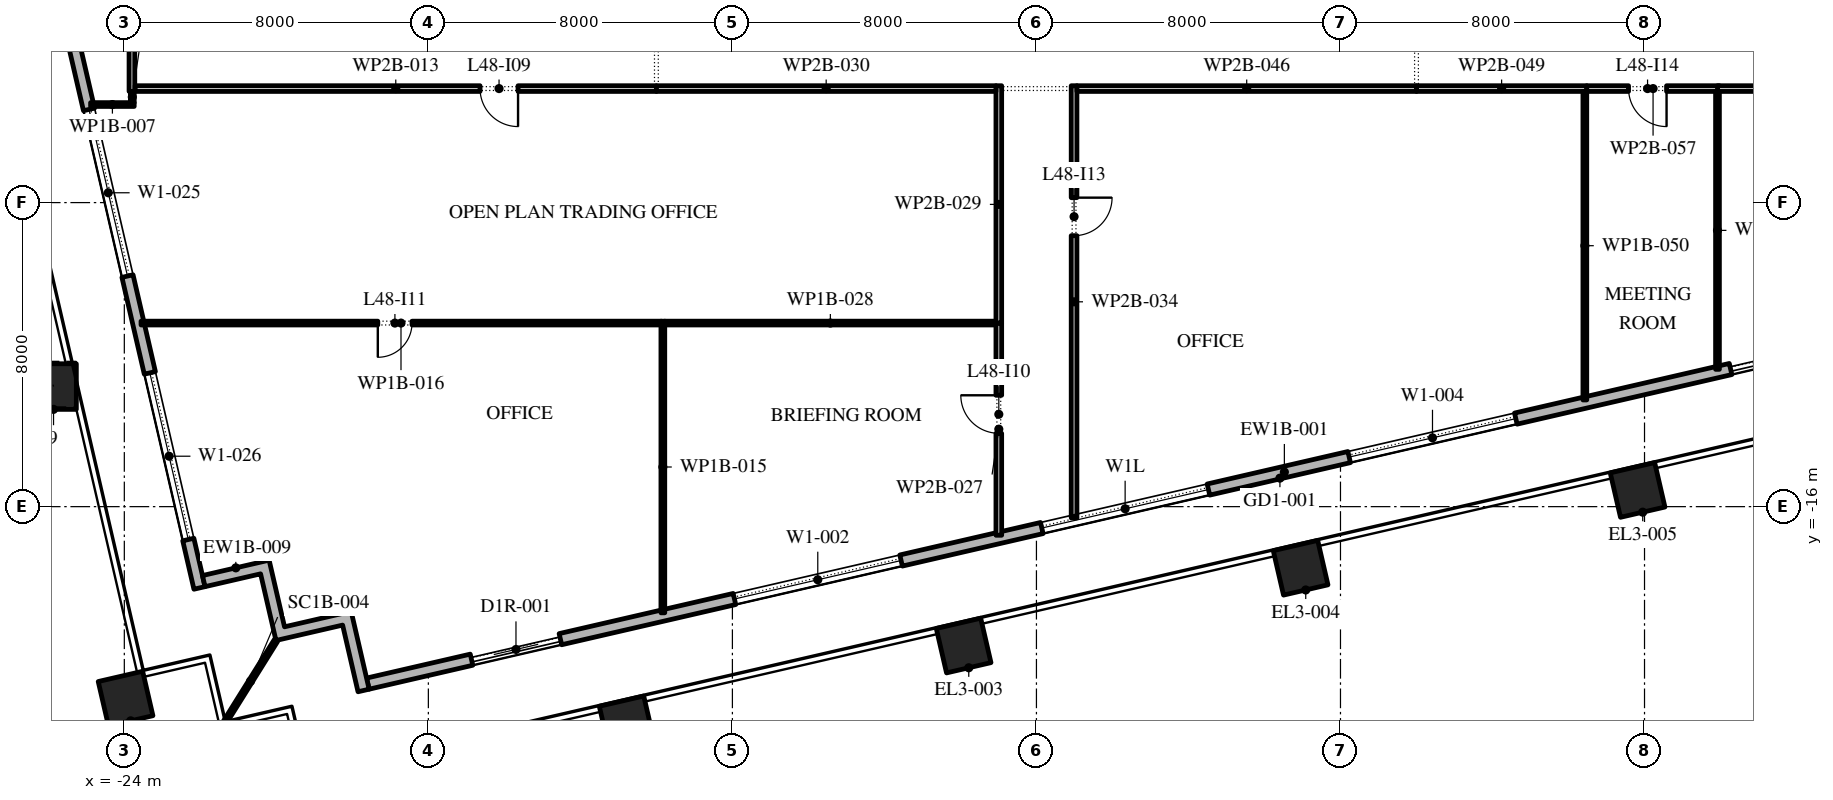
"""IFC4 building model, lengths in metres.
Left out: names, types, materials, properties, quantities, classifications, styles, units other than length and angle.
Written with IfcOpenShell. Run it as: python <this file> out.ifc"""

import sys

from ifc_helpers import new_model, si_unit, direction, frame, frame_2d, origin, origin_2d, place, context, subcontext, project, spatial, polyline, rectangle, outline, extrude, element, fill, save


model = new_model("IFC4")
c1 = context("Model", 3, precision=1e-05, world=origin(), true_north=direction((0.0, 1.0)))
c2 = subcontext(c1, "Body", "Model", "MODEL_VIEW")
j1 = project(units=[si_unit("LENGTHUNIT", "METRE"), si_unit("PLANEANGLEUNIT", "RADIAN")], contexts=[c1])
p1 = place(None, origin())
s1 = spatial("IfcSite", under=j1, at=p1, CompositionType="ELEMENT")
p2 = place(p1, origin())
s2 = spatial("IfcBuilding", under=s1, at=p2, CompositionType="ELEMENT")
p3 = place(p2, frame((0.0, 0.0, 217.8)))
s3 = spatial("IfcBuildingStorey", under=s2, at=p3, CompositionType="ELEMENT", Elevation=217.8)
for number, where, z_axis, x_axis in (
    (1, (-10.782, -21.702, 0.0), (0.0, 0.0, 1.0), (0.974, 0.225, 0.0)),
    (2, (-1.916, -19.655, 0.0), (0.0, 0.0, 1.0), (0.974, 0.225, 0.0)),
    (3, (6.951, -17.608, 0.0), (0.0, 0.0, 1.0), (0.974, 0.225, 0.0)),
    (4, (15.818, -15.561, 0.0), (0.0, 0.0, 1.0), (0.974, 0.225, 0.0)),
):
    element("IfcColumn", number, at=place(p3, frame(where, z_axis=z_axis, x_axis=x_axis)), inside=s3, PredefinedType="COLUMN", context=c2, shape_type="SweptSolid", body=[
        extrude(rectangle(XDim=1.2, YDim=1.2, at=origin_2d()), origin(), (0.0, 0.0, 1.0), 4.2),
    ])
p4 = place(p3, frame((-25.863, -12.841, 0.0), z_axis=(-0.00267376016, 0.011683169396, 0.9999281747), x_axis=(-0.974798272484, -0.223088161862, 0.0)))
e5 = element("IfcColumn", 5, at=p4, inside=s3, PredefinedType="COLUMN", context=c2, shape_type="SweptSolid", body=[
    extrude(rectangle(XDim=1.2, YDim=1.2, at=origin_2d()), origin(), (0.0, 0.0, 1.0), 4.2),
])
p5 = place(p3, frame((-23.967, -21.051, 0.0), z_axis=(0.0, 0.0, 1.0), x_axis=(0.974370064785, 0.224951054344, 0.0)))
e6 = element("IfcColumn", 6, at=p5, inside=s3, PredefinedType="COLUMN", context=c2, shape_type="SweptSolid", body=[
    extrude(rectangle(XDim=1.2, YDim=1.2, at=origin_2d()), origin(), (0.0, 0.0, 1.0), 4.2),
])
p6 = place(p3, frame((-17.592, -20.657, 0.0), z_axis=(0.0, 0.0, 1.0), x_axis=(0.974370243697, 0.224950279389, 0.0)))
e7 = element("IfcWall", 7, at=p6, inside=s3, PredefinedType="STANDARD", context=c2, shape_type="SweptSolid", body=[
    extrude(rectangle(XDim=49.5, YDim=0.3, at=frame_2d((24.75, 0.0))), origin(), (0.0, 0.0, 1.0), 3.95),
])
p7 = place(p6, frame((2.8, 0.0, 0.0)))
e8 = element("IfcOpeningElement", 8, at=p7, cuts=e7, PredefinedType="OPENING", context=c2, shape_type="SweptSolid", body=[
    extrude(rectangle(XDim=2.4, YDim=2.85, at=frame_2d((1.2, 1.425))), frame((0.0, 0.16, 0.0), z_axis=(0.0, -1.0, 0.0), x_axis=(1.0, 0.0, 0.0)), (0.0, 0.0, 1.0), 0.32),
])
p8 = place(p6, frame((9.9, 0.0, 0.45)))
e9 = element("IfcOpeningElement", 9, at=p8, cuts=e7, PredefinedType="OPENING", context=c2, shape_type="SweptSolid", body=[
    extrude(rectangle(XDim=4.5, YDim=3.05, at=frame_2d((2.25, 1.525))), frame((0.0, 0.16, 0.0), z_axis=(0.0, -1.0, 0.0), x_axis=(1.0, 0.0, 0.0)), (0.0, 0.0, 1.0), 0.32),
])
p9 = place(p6, frame((18.2, 0.0, 0.45)))
e10 = element("IfcOpeningElement", 10, at=p9, cuts=e7, PredefinedType="OPENING", context=c2, shape_type="SweptSolid", body=[
    extrude(rectangle(XDim=4.5, YDim=2.625, at=frame_2d((2.25, 1.312))), frame((0.0, 0.16, 0.0), z_axis=(0.0, -1.0, 0.0), x_axis=(1.0, 0.0, 0.0)), (0.0, 0.0, 1.0), 0.32),
])
p10 = place(p6, frame((26.5, 0.0, 0.45)))
e11 = element("IfcOpeningElement", 11, at=p10, cuts=e7, PredefinedType="OPENING", context=c2, shape_type="SweptSolid", body=[
    extrude(rectangle(XDim=4.5, YDim=3.05, at=frame_2d((2.25, 1.525))), frame((0.0, 0.16, 0.0), z_axis=(0.0, -1.0, 0.0), x_axis=(1.0, 0.0, 0.0)), (0.0, 0.0, 1.0), 0.32),
])
p11 = place(p6, frame((36.8, 0.0, 0.0)))
e12 = element("IfcOpeningElement", 12, at=p11, cuts=e7, PredefinedType="OPENING", context=c2, shape_type="SweptSolid", body=[
    extrude(rectangle(XDim=2.4, YDim=3.225, at=frame_2d((1.2, 1.613))), frame((0.0, 0.16, 0.0), z_axis=(0.0, -1.0, 0.0), x_axis=(1.0, 0.0, 0.0)), (0.0, 0.0, 1.0), 0.32),
])
p12 = place(p6, frame((43.1, 0.0, 0.45)))
e13 = element("IfcOpeningElement", 13, at=p12, cuts=e7, PredefinedType="OPENING", context=c2, shape_type="SweptSolid", body=[
    extrude(rectangle(XDim=4.5, YDim=2.825, at=frame_2d((2.25, 1.413))), frame((0.0, 0.16, 0.0), z_axis=(0.0, -1.0, 0.0), x_axis=(1.0, 0.0, 0.0)), (0.0, 0.0, 1.0), 0.32),
])
p13 = place(p3, frame((-33.157, 30.092, 0.0), z_axis=(0.0, 0.0, 1.0), x_axis=(0.224950279389, -0.974370243697, 0.0)))
e14 = element("IfcWall", 14, at=p13, inside=s3, PredefinedType="STANDARD", context=c2, shape_type="SweptSolid", body=[
    extrude(rectangle(XDim=49.5, YDim=0.3, at=frame_2d((24.75, 0.0))), origin(), (0.0, 0.0, 1.0), 3.95),
])
p14 = place(p13, frame((2.207, 0.0, 0.0)))
e15 = element("IfcOpeningElement", 15, at=p14, cuts=e14, PredefinedType="OPENING", context=c2, shape_type="SweptSolid", body=[
    extrude(rectangle(XDim=2.4, YDim=3.5, at=frame_2d((1.2, 1.75))), frame((0.0, 0.16, 0.0), z_axis=(0.0, -1.0, 0.0), x_axis=(1.0, 0.0, 0.0)), (0.0, 0.0, 1.0), 0.32),
])
p15 = place(p13, frame((8.121, 0.0, 0.45)))
e16 = element("IfcOpeningElement", 16, at=p15, cuts=e14, PredefinedType="OPENING", context=c2, shape_type="SweptSolid", body=[
    extrude(rectangle(XDim=4.5, YDim=2.775, at=frame_2d((2.25, 1.387))), frame((0.0, 0.16, 0.0), z_axis=(0.0, -1.0, 0.0), x_axis=(1.0, 0.0, 0.0)), (0.0, 0.0, 1.0), 0.32),
])
p16 = place(p13, frame((15.236, 0.0, 0.45)))
e17 = element("IfcOpeningElement", 17, at=p16, cuts=e14, PredefinedType="OPENING", context=c2, shape_type="SweptSolid", body=[
    extrude(rectangle(XDim=4.5, YDim=2.9, at=frame_2d((2.25, 1.45))), frame((0.0, 0.16, 0.0), z_axis=(0.0, -1.0, 0.0), x_axis=(1.0, 0.0, 0.0)), (0.0, 0.0, 1.0), 0.32),
])
p17 = place(p13, frame((22.35, 0.0, 0.45)))
e18 = element("IfcOpeningElement", 18, at=p17, cuts=e14, PredefinedType="OPENING", context=c2, shape_type="SweptSolid", body=[
    extrude(rectangle(XDim=4.5, YDim=2.95, at=frame_2d((2.25, 1.475))), frame((0.0, 0.16, 0.0), z_axis=(0.0, -1.0, 0.0), x_axis=(1.0, 0.0, 0.0)), (0.0, 0.0, 1.0), 0.32),
])
p18 = place(p13, frame((30.514, 0.0, 0.0)))
e19 = element("IfcOpeningElement", 19, at=p18, cuts=e14, PredefinedType="OPENING", context=c2, shape_type="SweptSolid", body=[
    extrude(rectangle(XDim=2.4, YDim=3.5, at=frame_2d((1.2, 1.75))), frame((0.0, 0.16, 0.0), z_axis=(0.0, -1.0, 0.0), x_axis=(1.0, 0.0, 0.0)), (0.0, 0.0, 1.0), 0.32),
])
p19 = place(p13, frame((36.579, 0.0, 0.45)))
e20 = element("IfcOpeningElement", 20, at=p19, cuts=e14, PredefinedType="OPENING", context=c2, shape_type="SweptSolid", body=[
    extrude(rectangle(XDim=4.5, YDim=3.05, at=frame_2d((2.25, 1.525))), frame((0.0, 0.16, 0.0), z_axis=(0.0, -1.0, 0.0), x_axis=(1.0, 0.0, 0.0)), (0.0, 0.0, 1.0), 0.32),
])
p20 = place(p13, frame((43.693, 0.0, 0.45)))
e21 = element("IfcOpeningElement", 21, at=p20, cuts=e14, PredefinedType="OPENING", context=c2, shape_type="SweptSolid", body=[
    extrude(rectangle(XDim=4.5, YDim=3.05, at=frame_2d((2.25, 1.525))), frame((0.0, 0.16, 0.0), z_axis=(0.0, -1.0, 0.0), x_axis=(1.0, 0.0, 0.0)), (0.0, 0.0, 1.0), 0.32),
])
p21 = place(p3, origin())
e22 = element("IfcWall", 22, at=p21, inside=s3, PredefinedType="STANDARD", context=c2, shape_type="SweptSolid", body=[
    extrude(outline(polyline([(-18.256, -19.117), (-20.01, -19.522), (-20.414, -17.768), (-21.876, -18.105), (-21.943, -17.813), (-20.19, -17.408), (-19.785, -19.162), (-18.031, -18.757), (-17.558, -20.803), (-17.851, -20.871), (-18.256, -19.117)])), origin(), (0.0, 0.0, 1.0), 3.95),
])
p22 = place(p3, frame((-20.01, -19.522, -0.05), z_axis=(0.0, 0.0, 1.0), x_axis=(-0.529920736377, -0.848047176257, 0.0)))
e23 = element("IfcWall", 23, at=p22, inside=s3, PredefinedType="STANDARD", context=c2, shape_type="SweptSolid", body=[
    extrude(rectangle(XDim=2.526, YDim=0.1, at=frame_2d((1.263, 0.0))), origin(), (0.0, 0.0, 1.0), 4.0),
])
p23 = place(p3, frame((-23.8, -5.075, 0.0), z_axis=(0.0, 0.0, 1.0), x_axis=(0.0, 1.0, 0.0)))
e24 = element("IfcWall", 24, at=p23, inside=s3, PredefinedType="PARTITIONING", context=c2, shape_type="SweptSolid", body=[
    extrude(rectangle(XDim=13.525, YDim=0.15, at=frame_2d((6.762, 0.0))), origin(), (0.0, 0.0, 1.0), 3.95),
])
p24 = place(p23, frame((7.625, 0.0, 0.0)))
e25 = element("IfcOpeningElement", 25, at=p24, cuts=e24, PredefinedType="OPENING", context=c2, shape_type="SweptSolid", body=[
    extrude(rectangle(XDim=1.0, YDim=2.1, at=frame_2d((0.5, 1.05))), frame((0.0, 0.085, 0.0), z_axis=(0.0, -1.0, 0.0), x_axis=(1.0, 0.0, 0.0)), (0.0, 0.0, 1.0), 0.17),
])
p25 = place(p3, frame((-23.74, -5.42, 0.0), z_axis=(0.0, 0.0, 1.0), x_axis=(-1.0, 0.0, 0.0)))
e26 = element("IfcWall", 26, at=p25, inside=s3, PredefinedType="PARTITIONING", context=c2, shape_type="SweptSolid", body=[
    extrude(rectangle(XDim=1.147, YDim=0.1, at=frame_2d((0.573, 0.0))), origin(), (0.0, 0.0, 1.0), 3.95),
])
p26 = place(p3, frame((-23.79, -5.075, 0.0), z_axis=(0.0, 0.0, 1.0), x_axis=(0.0, -1.0, 0.0)))
e27 = element("IfcWall", 27, at=p26, inside=s3, PredefinedType="PARTITIONING", context=c2, shape_type="SweptSolid", body=[
    extrude(rectangle(XDim=0.295, YDim=0.1, at=frame_2d((0.147, 0.0))), origin(), (0.0, 0.0, 1.0), 3.95),
])
p27 = place(p3, frame((-10.0, -5.0, 0.0), z_axis=(0.0, 0.0, 1.0), x_axis=(-1.0, 0.0, 0.0)))
e28 = element("IfcWall", 28, at=p27, inside=s3, PredefinedType="PARTITIONING", context=c2, shape_type="SweptSolid", body=[
    extrude(rectangle(XDim=13.715, YDim=0.15, at=frame_2d((6.857, 0.0))), origin(), (0.0, 0.0, 1.0), 3.95),
])
p28 = place(p27, frame((3.64, 0.0, 0.0)))
e29 = element("IfcOpeningElement", 29, at=p28, cuts=e28, PredefinedType="OPENING", context=c2, shape_type="SweptSolid", body=[
    extrude(rectangle(XDim=1.0, YDim=2.1, at=frame_2d((0.5, 1.05))), frame((0.0, 0.085, 0.0), z_axis=(0.0, -1.0, 0.0), x_axis=(1.0, 0.0, 0.0)), (0.0, 0.0, 1.0), 0.17),
])
p29 = place(p3, frame((-9.83, -18.794, 0.0), z_axis=(0.0, 0.0, 1.0), x_axis=(0.0, 1.0, 0.0)))
e30 = element("IfcWall", 30, at=p29, inside=s3, PredefinedType="PARTITIONING", context=c2, shape_type="SweptSolid", body=[
    extrude(rectangle(XDim=7.674, YDim=0.1, at=frame_2d((3.837, 0.0))), origin(), (0.0, 0.0, 1.0), 3.95),
])
p30 = place(p3, frame((-9.88, -11.17, 0.0), z_axis=(0.0, 0.0, 1.0), x_axis=(-1.0, 0.0, 0.0)))
e31 = element("IfcWall", 31, at=p30, inside=s3, PredefinedType="PARTITIONING", context=c2, shape_type="SweptSolid", body=[
    extrude(rectangle(XDim=13.68, YDim=0.1, at=frame_2d((6.84, 0.0))), origin(), (0.0, 0.0, 1.0), 3.95),
])
p31 = place(p30, frame((6.55, 0.0, 0.0)))
e32 = element("IfcOpeningElement", 32, at=p31, cuts=e31, PredefinedType="OPENING", context=c2, shape_type="SweptSolid", body=[
    extrude(rectangle(XDim=0.9, YDim=2.1, at=frame_2d((0.45, 1.05))), frame((0.0, 0.06, 0.0), z_axis=(0.0, -1.0, 0.0), x_axis=(1.0, 0.0, 0.0)), (0.0, 0.0, 1.0), 0.12),
])
p32 = place(p3, frame((-0.99, -16.753, 0.0), z_axis=(0.0, 0.0, 1.0), x_axis=(0.0, 1.0, 0.0)))
e33 = element("IfcWall", 33, at=p32, inside=s3, PredefinedType="PARTITIONING", context=c2, shape_type="SweptSolid", body=[
    extrude(rectangle(XDim=5.583, YDim=0.15, at=frame_2d((2.792, 0.0))), origin(), (0.0, 0.0, 1.0), 3.95),
])
p33 = place(p32, frame((2.683, 0.0, 0.0)))
e34 = element("IfcOpeningElement", 34, at=p33, cuts=e33, PredefinedType="OPENING", context=c2, shape_type="SweptSolid", body=[
    extrude(rectangle(XDim=1.0, YDim=2.1, at=frame_2d((0.5, 1.05))), frame((0.0, 0.085, 0.0), z_axis=(0.0, -1.0, 0.0), x_axis=(1.0, 0.0, 0.0)), (0.0, 0.0, 1.0), 0.17),
])
p34 = place(p3, frame((-1.065, -11.17, 0.0), z_axis=(0.0, 0.0, 1.0), x_axis=(-1.0, 0.0, 0.0)))
e35 = element("IfcWall", 35, at=p34, inside=s3, PredefinedType="PARTITIONING", context=c2, shape_type="SweptSolid", body=[
    extrude(rectangle(XDim=8.715, YDim=0.1, at=frame_2d((4.357, 0.0))), origin(), (0.0, 0.0, 1.0), 3.95),
])
p35 = place(p3, frame((-0.99, -11.17, 0.0), z_axis=(0.0, 0.0, 1.0), x_axis=(0.0, 1.0, 0.0)))
e36 = element("IfcWall", 36, at=p35, inside=s3, PredefinedType="PARTITIONING", context=c2, shape_type="SweptSolid", body=[
    extrude(rectangle(XDim=6.245, YDim=0.15, at=frame_2d((3.123, 0.0))), origin(), (0.0, 0.0, 1.0), 3.95),
])
p36 = place(p3, frame((-1.065, -5.0, 0.0), z_axis=(0.0, 0.0, 1.0), x_axis=(-1.0, 0.0, 0.0)))
e37 = element("IfcWall", 37, at=p36, inside=s3, PredefinedType="PARTITIONING", context=c2, shape_type="SweptSolid", body=[
    extrude(rectangle(XDim=8.935, YDim=0.15, at=frame_2d((4.468, 0.0))), origin(), (0.0, 0.0, 1.0), 3.95),
])
p37 = place(p3, frame((0.99, -4.925, 0.0), z_axis=(0.0, 0.0, 1.0), x_axis=(0.0, -1.0, 0.0)))
e38 = element("IfcWall", 38, at=p37, inside=s3, PredefinedType="PARTITIONING", context=c2, shape_type="SweptSolid", body=[
    extrude(rectangle(XDim=11.371, YDim=0.15, at=frame_2d((5.686, 0.0))), origin(), (0.0, 0.0, 1.0), 3.95),
])
p38 = place(p37, frame((2.945, 0.0, 0.0)))
e39 = element("IfcOpeningElement", 39, at=p38, cuts=e38, PredefinedType="OPENING", context=c2, shape_type="SweptSolid", body=[
    extrude(rectangle(XDim=1.0, YDim=2.1, at=frame_2d((0.5, 1.05))), frame((0.0, 0.085, 0.0), z_axis=(0.0, -1.0, 0.0), x_axis=(1.0, 0.0, 0.0)), (0.0, 0.0, 1.0), 0.17),
])
p39 = place(p3, frame((10.0, -5.0, 0.0), z_axis=(0.0, 0.0, 1.0), x_axis=(-1.0, 0.0, 0.0)))
e40 = element("IfcWall", 40, at=p39, inside=s3, PredefinedType="PARTITIONING", context=c2, shape_type="SweptSolid", body=[
    extrude(rectangle(XDim=8.935, YDim=0.15, at=frame_2d((4.468, 0.0))), origin(), (0.0, 0.0, 1.0), 3.95),
])
p40 = place(p3, frame((14.48, -5.0, 0.0), z_axis=(0.0, 0.0, 1.0), x_axis=(-1.0, 0.0, 0.0)))
e41 = element("IfcWall", 41, at=p40, inside=s3, PredefinedType="PARTITIONING", context=c2, shape_type="SweptSolid", body=[
    extrude(rectangle(XDim=4.48, YDim=0.15, at=frame_2d((2.24, 0.0))), origin(), (0.0, 0.0, 1.0), 3.95),
])
p41 = place(p3, frame((14.43, -5.075, 0.0), z_axis=(0.0, 0.0, 1.0), x_axis=(0.0, -1.0, 0.0)))
e42 = element("IfcWall", 42, at=p41, inside=s3, PredefinedType="PARTITIONING", context=c2, shape_type="SweptSolid", body=[
    extrude(rectangle(XDim=8.118, YDim=0.1, at=frame_2d((4.059, 0.0))), origin(), (0.0, 0.0, 1.0), 3.95),
])
p42 = place(p3, frame((17.97, -5.0, 0.0), z_axis=(0.0, 0.0, 1.0), x_axis=(-1.0, 0.0, 0.0)))
e43 = element("IfcWall", 43, at=p42, inside=s3, PredefinedType="PARTITIONING", context=c2, shape_type="SweptSolid", body=[
    extrude(rectangle(XDim=3.49, YDim=0.15, at=frame_2d((1.745, 0.0))), origin(), (0.0, 0.0, 1.0), 3.95),
])
p43 = place(p42, frame((1.39, 0.0, 0.0)))
e44 = element("IfcOpeningElement", 44, at=p43, cuts=e43, PredefinedType="OPENING", context=c2, shape_type="SweptSolid", body=[
    extrude(rectangle(XDim=1.0, YDim=2.1, at=frame_2d((0.5, 1.05))), frame((0.0, 0.085, 0.0), z_axis=(0.0, -1.0, 0.0), x_axis=(1.0, 0.0, 0.0)), (0.0, 0.0, 1.0), 0.17),
])
p44 = place(p3, frame((17.92, -5.075, 0.0), z_axis=(0.0, 0.0, 1.0), x_axis=(0.0, -1.0, 0.0)))
e45 = element("IfcWall", 45, at=p44, inside=s3, PredefinedType="PARTITIONING", context=c2, shape_type="SweptSolid", body=[
    extrude(rectangle(XDim=7.312, YDim=0.1, at=frame_2d((3.656, 0.0))), origin(), (0.0, 0.0, 1.0), 3.95),
])
p45 = place(p3, frame((22.57, -5.0, 0.0), z_axis=(0.0, 0.0, 1.0), x_axis=(-1.0, 0.0, 0.0)))
e46 = element("IfcWall", 46, at=p45, inside=s3, PredefinedType="PARTITIONING", context=c2, shape_type="SweptSolid", body=[
    extrude(rectangle(XDim=4.65, YDim=0.15, at=frame_2d((2.325, 0.0))), origin(), (0.0, 0.0, 1.0), 3.95),
])
p46 = place(p45, frame((1.5, 0.0, 0.0)))
e47 = element("IfcOpeningElement", 47, at=p46, cuts=e46, PredefinedType="OPENING", context=c2, shape_type="SweptSolid", body=[
    extrude(rectangle(XDim=1.0, YDim=2.1, at=frame_2d((0.5, 1.05))), frame((0.0, 0.085, 0.0), z_axis=(0.0, -1.0, 0.0), x_axis=(1.0, 0.0, 0.0)), (0.0, 0.0, 1.0), 0.17),
])
p47 = place(p7, origin())
e48 = element("IfcDoor", 48, at=p47, inside=s3, OperationType="DOUBLE_DOOR_SLIDING", PredefinedType="DOOR", context=c2, shape_type="SweptSolid", body=[
    extrude(rectangle(XDim=2.4, YDim=2.85, at=frame_2d((1.2, 1.425))), frame((0.0, 0.025, 0.0), z_axis=(0.0, -1.0, 0.0), x_axis=(1.0, 0.0, 0.0)), (0.0, 0.0, 1.0), 0.05),
])
fill(e8, e48)
p48 = place(p8, origin())
e49 = element("IfcWindow", 49, at=p48, inside=s3, PartitioningType="DOUBLE_PANEL_VERTICAL", PredefinedType="WINDOW", context=c2, shape_type="SweptSolid", body=[
    extrude(rectangle(XDim=4.5, YDim=3.05, at=frame_2d((2.25, 1.525))), frame((0.0, 0.03, 0.0), z_axis=(0.0, -1.0, 0.0), x_axis=(1.0, 0.0, 0.0)), (0.0, 0.0, 1.0), 0.06),
])
fill(e9, e49)
p49 = place(p9, origin())
e50 = element("IfcWindow", 50, at=p49, inside=s3, PartitioningType="DOUBLE_PANEL_VERTICAL", PredefinedType="WINDOW", context=c2, shape_type="SweptSolid", body=[
    extrude(rectangle(XDim=4.5, YDim=2.625, at=frame_2d((2.25, 1.312))), frame((0.0, 0.03, 0.0), z_axis=(0.0, -1.0, 0.0), x_axis=(1.0, 0.0, 0.0)), (0.0, 0.0, 1.0), 0.06),
])
fill(e10, e50)
p50 = place(p10, origin())
e51 = element("IfcWindow", 51, at=p50, inside=s3, PartitioningType="DOUBLE_PANEL_VERTICAL", PredefinedType="WINDOW", context=c2, shape_type="SweptSolid", body=[
    extrude(rectangle(XDim=4.5, YDim=3.05, at=frame_2d((2.25, 1.525))), frame((0.0, 0.03, 0.0), z_axis=(0.0, -1.0, 0.0), x_axis=(1.0, 0.0, 0.0)), (0.0, 0.0, 1.0), 0.06),
])
fill(e11, e51)
p51 = place(p11, origin())
e52 = element("IfcDoor", 52, at=p51, inside=s3, OperationType="DOUBLE_DOOR_SLIDING", PredefinedType="DOOR", context=c2, shape_type="SweptSolid", body=[
    extrude(rectangle(XDim=2.4, YDim=3.225, at=frame_2d((1.2, 1.613))), frame((0.0, 0.025, 0.0), z_axis=(0.0, -1.0, 0.0), x_axis=(1.0, 0.0, 0.0)), (0.0, 0.0, 1.0), 0.05),
])
fill(e12, e52)
p52 = place(p19, origin())
e53 = element("IfcWindow", 53, at=p52, inside=s3, PartitioningType="DOUBLE_PANEL_VERTICAL", PredefinedType="WINDOW", context=c2, shape_type="SweptSolid", body=[
    extrude(rectangle(XDim=4.5, YDim=3.05, at=frame_2d((2.25, 1.525))), frame((0.0, 0.03, 0.0), z_axis=(0.0, -1.0, 0.0), x_axis=(1.0, 0.0, 0.0)), (0.0, 0.0, 1.0), 0.06),
])
fill(e20, e53)
p53 = place(p20, origin())
e54 = element("IfcWindow", 54, at=p53, inside=s3, PartitioningType="DOUBLE_PANEL_VERTICAL", PredefinedType="WINDOW", context=c2, shape_type="SweptSolid", body=[
    extrude(rectangle(XDim=4.5, YDim=3.05, at=frame_2d((2.25, 1.525))), frame((0.0, 0.03, 0.0), z_axis=(0.0, -1.0, 0.0), x_axis=(1.0, 0.0, 0.0)), (0.0, 0.0, 1.0), 0.06),
])
fill(e21, e54)
p54 = place(p28, origin())
e55 = element("IfcDoor", 55, at=p54, inside=s3, OperationType="SINGLE_SWING_RIGHT", PredefinedType="DOOR", context=c2, shape_type="SweptSolid", body=[
    extrude(rectangle(XDim=1.0, YDim=2.1, at=frame_2d((0.5, 1.05))), frame((0.0, 0.025, 0.0), z_axis=(0.0, -1.0, 0.0), x_axis=(1.0, 0.0, 0.0)), (0.0, 0.0, 1.0), 0.05),
])
fill(e29, e55)
p55 = place(p33, origin())
e56 = element("IfcDoor", 56, at=p55, inside=s3, OperationType="SINGLE_SWING_LEFT", PredefinedType="DOOR", context=c2, shape_type="SweptSolid", body=[
    extrude(rectangle(XDim=1.0, YDim=2.1, at=frame_2d((0.5, 1.05))), frame((0.0, 0.025, 0.0), z_axis=(0.0, -1.0, 0.0), x_axis=(1.0, 0.0, 0.0)), (0.0, 0.0, 1.0), 0.05),
])
fill(e34, e56)
p56 = place(p31, origin())
e57 = element("IfcDoor", 57, at=p56, inside=s3, OperationType="SINGLE_SWING_LEFT", PredefinedType="DOOR", context=c2, shape_type="SweptSolid", body=[
    extrude(rectangle(XDim=0.9, YDim=2.1, at=frame_2d((0.45, 1.05))), frame((0.0, 0.025, 0.0), z_axis=(0.0, -1.0, 0.0), x_axis=(1.0, 0.0, 0.0)), (0.0, 0.0, 1.0), 0.05),
])
fill(e32, e57)
p57 = place(p38, origin())
e58 = element("IfcDoor", 58, at=p57, inside=s3, OperationType="SINGLE_SWING_RIGHT", PredefinedType="DOOR", context=c2, shape_type="SweptSolid", body=[
    extrude(rectangle(XDim=1.0, YDim=2.1, at=frame_2d((0.5, 1.05))), frame((0.0, 0.025, 0.0), z_axis=(0.0, -1.0, 0.0), x_axis=(1.0, 0.0, 0.0)), (0.0, 0.0, 1.0), 0.05),
])
fill(e39, e58)
p58 = place(p43, origin())
e59 = element("IfcDoor", 59, at=p58, inside=s3, OperationType="SINGLE_SWING_RIGHT", PredefinedType="DOOR", context=c2, shape_type="SweptSolid", body=[
    extrude(rectangle(XDim=1.0, YDim=2.1, at=frame_2d((0.5, 1.05))), frame((0.0, 0.025, 0.0), z_axis=(0.0, -1.0, 0.0), x_axis=(1.0, 0.0, 0.0)), (0.0, 0.0, 1.0), 0.05),
])
fill(e44, e59)
save(model, sys.argv[1])
